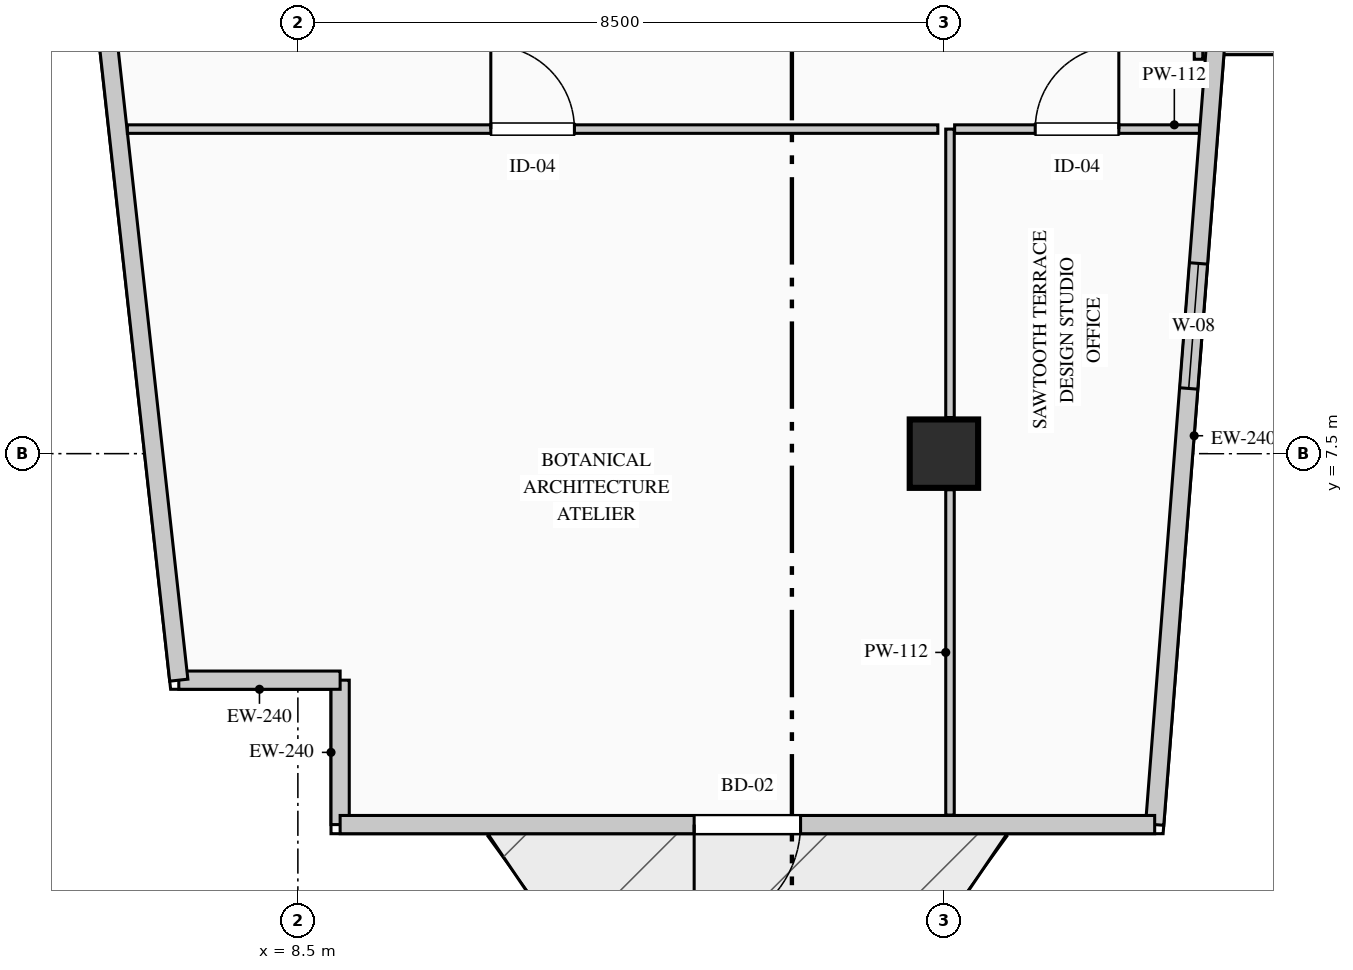
"""IFC4 building model, lengths in metres.
Left out: names, types, materials, properties, quantities, classifications, styles, units other than length and angle.
Written with IfcOpenShell. Run it as: python <this file> out.ifc"""

import sys

from ifc_helpers import new_model, si_unit, direction, frame, frame_2d, origin, origin_2d, place, context, subcontext, project, spatial, rectangle, extrude, element, fill, save


model = new_model("IFC4")
c1 = context("Model", 3, precision=1e-05, world=origin(), true_north=direction((0.0, 1.0)))
c2 = subcontext(c1, "Body", "Model", "MODEL_VIEW")
j1 = project(units=[si_unit("LENGTHUNIT", "METRE"), si_unit("PLANEANGLEUNIT", "RADIAN")], contexts=[c1])
p1 = place(None, origin())
s1 = spatial("IfcSite", under=j1, at=p1, CompositionType="ELEMENT")
p2 = place(p1, origin())
s2 = spatial("IfcBuilding", under=s1, at=p2, CompositionType="ELEMENT")
p3 = place(p2, frame((0.0, 0.0, 239.05)))
s3 = spatial("IfcBuildingStorey", under=s2, at=p3, CompositionType="ELEMENT", Elevation=239.05)
p4 = place(p3, frame((17.0, 7.5, 0.0), z_axis=(0.0, 0.0, 1.0), x_axis=(1.0, 0.0, 0.0)))
e1 = element("IfcColumn", 1, at=p4, inside=s3, PredefinedType="COLUMN", context=c2, shape_type="SweptSolid", body=[
    extrude(rectangle(XDim=0.9, YDim=0.9, at=origin_2d()), origin(), (0.0, 0.0, 1.0), 3.95),
])
p5 = place(p3, frame((9.056, 2.62, 0.0), z_axis=(0.0, 0.0, 1.0), x_axis=(0.0, 1.0, 0.0)))
e2 = element("IfcWall", 2, at=p5, inside=s3, PredefinedType="STANDARD", context=c2, shape_type="SweptSolid", body=[
    extrude(rectangle(XDim=1.9, YDim=0.24, at=frame_2d((0.95, 0.0))), origin(), (0.0, 0.0, 1.0), 3.7),
])
p6 = place(p3, frame((9.056, 4.52, 0.0), z_axis=(0.0, 0.0, 1.0), x_axis=(-1.0, 0.0, 0.0)))
e3 = element("IfcWall", 3, at=p6, inside=s3, PredefinedType="STANDARD", context=c2, shape_type="SweptSolid", body=[
    extrude(rectangle(XDim=2.123, YDim=0.24, at=frame_2d((1.061, 0.0))), origin(), (0.0, 0.0, 1.0), 3.7),
])
p7 = place(p3, frame((6.933, 4.52, 0.0), z_axis=(0.0, 0.0, 1.0), x_axis=(-0.109965284523, 0.993935428587, 0.0)))
e4 = element("IfcWall", 4, at=p7, inside=s3, PredefinedType="STANDARD", context=c2, shape_type="SweptSolid", body=[
    extrude(rectangle(XDim=37.186, YDim=0.24, at=frame_2d((18.593, 0.0))), origin(), (0.0, 0.0, 1.0), 3.7),
])
p8 = place(p7, frame((12.562, 0.0, 0.9)))
e5 = element("IfcOpeningElement", 5, at=p8, cuts=e4, PredefinedType="OPENING", context=c2, shape_type="SweptSolid", body=[
    extrude(rectangle(XDim=1.65, YDim=1.95, at=frame_2d((0.825, 0.975))), frame((0.0, 0.13, 0.0), z_axis=(0.0, -1.0, 0.0), x_axis=(1.0, 0.0, 0.0)), (0.0, 0.0, 1.0), 0.26),
])
p9 = place(p3, frame((26.495, 12.87, 0.0), z_axis=(0.0, 0.0, 1.0), x_axis=(-1.0, 0.0, 0.0)))
e6 = element("IfcWall", 6, at=p9, inside=s3, PredefinedType="STANDARD", context=c2, shape_type="SweptSolid", body=[
    extrude(rectangle(XDim=5.922, YDim=0.24, at=frame_2d((2.961, 0.0))), origin(), (0.0, 0.0, 1.0), 3.7),
])
p10 = place(p3, frame((20.573, 12.87, 0.0), z_axis=(0.0, 0.0, 1.0), x_axis=(-0.077816860153, -0.996967670627, 0.0)))
e7 = element("IfcWall", 7, at=p10, inside=s3, PredefinedType="STANDARD", context=c2, shape_type="SweptSolid", body=[
    extrude(rectangle(XDim=10.281, YDim=0.24, at=frame_2d((5.141, 0.0))), origin(), (0.0, 0.0, 1.0), 3.7),
])
p11 = place(p10, frame((2.876, 0.0, 0.9)))
e8 = element("IfcOpeningElement", 8, at=p11, cuts=e7, PredefinedType="OPENING", context=c2, shape_type="SweptSolid", body=[
    extrude(rectangle(XDim=1.65, YDim=1.95, at=frame_2d((0.825, 0.975))), frame((0.0, 0.13, 0.0), z_axis=(0.0, -1.0, 0.0), x_axis=(1.0, 0.0, 0.0)), (0.0, 0.0, 1.0), 0.26),
])
p12 = place(p3, frame((19.773, 2.62, 0.0), z_axis=(0.0, 0.0, 1.0), x_axis=(-1.0, 0.0, 0.0)))
e9 = element("IfcWall", 9, at=p12, inside=s3, PredefinedType="STANDARD", context=c2, shape_type="SweptSolid", body=[
    extrude(rectangle(XDim=10.717, YDim=0.24, at=frame_2d((5.358, 0.0))), origin(), (0.0, 0.0, 1.0), 3.7),
])
p13 = place(p12, frame((4.659, 0.0, 0.0)))
e10 = element("IfcOpeningElement", 10, at=p13, cuts=e9, PredefinedType="OPENING", context=c2, shape_type="SweptSolid", body=[
    extrude(rectangle(XDim=1.4, YDim=2.2, at=frame_2d((0.7, 1.1))), frame((0.0, 0.13, 0.0), z_axis=(0.0, -1.0, 0.0), x_axis=(1.0, 0.0, 0.0)), (0.0, 0.0, 1.0), 0.26),
])
p14 = place(p3, frame((17.08, 2.745, 0.0), z_axis=(0.0, 0.0, 1.0), x_axis=(0.0, 1.0, 0.0)))
e11 = element("IfcWall", 11, at=p14, inside=s3, PredefinedType="PARTITIONING", context=c2, shape_type="SweptSolid", body=[
    extrude(rectangle(XDim=4.28, YDim=0.112, at=frame_2d((2.14, 0.0))), origin(), (0.0, 0.0, 1.0), 3.7),
])
p15 = place(p3, frame((17.08, 7.975, 0.0), z_axis=(0.0, 0.0, 1.0), x_axis=(0.0, 1.0, 0.0)))
e12 = element("IfcWall", 12, at=p15, inside=s3, PredefinedType="PARTITIONING", context=c2, shape_type="SweptSolid", body=[
    extrude(rectangle(XDim=3.795, YDim=0.112, at=frame_2d((1.897, 0.0))), origin(), (0.0, 0.0, 1.0), 3.185),
])
p16 = place(p3, frame((17.141, 11.77, 0.0), z_axis=(0.0, 0.0, 1.0), x_axis=(1.0, 0.0, 0.0)))
e13 = element("IfcWall", 13, at=p16, inside=s3, PredefinedType="PARTITIONING", context=c2, shape_type="SweptSolid", body=[
    extrude(rectangle(XDim=3.221, YDim=0.112, at=frame_2d((1.61, 0.0))), origin(), (0.0, 0.0, 1.0), 3.7),
])
p17 = place(p16, frame((1.06, 0.0, 0.0)))
e14 = element("IfcOpeningElement", 14, at=p17, cuts=e13, PredefinedType="OPENING", context=c2, shape_type="SweptSolid", body=[
    extrude(rectangle(XDim=1.1, YDim=2.2, at=frame_2d((0.55, 1.1))), frame((0.0, 0.066, 0.0), z_axis=(0.0, -1.0, 0.0), x_axis=(1.0, 0.0, 0.0)), (0.0, 0.0, 1.0), 0.132),
])
p18 = place(p3, frame((6.257, 11.77, 0.0), z_axis=(0.0, 0.0, 1.0), x_axis=(1.0, 0.0, 0.0)))
e15 = element("IfcWall", 15, at=p18, inside=s3, PredefinedType="PARTITIONING", context=c2, shape_type="SweptSolid", body=[
    extrude(rectangle(XDim=10.663, YDim=0.112, at=frame_2d((5.332, 0.0))), origin(), (0.0, 0.0, 1.0), 3.7),
])
p19 = place(p18, frame((4.781, 0.0, 0.0)))
e16 = element("IfcOpeningElement", 16, at=p19, cuts=e15, PredefinedType="OPENING", context=c2, shape_type="SweptSolid", body=[
    extrude(rectangle(XDim=1.1, YDim=2.2, at=frame_2d((0.55, 1.1))), frame((0.0, 0.066, 0.0), z_axis=(0.0, -1.0, 0.0), x_axis=(1.0, 0.0, 0.0)), (0.0, 0.0, 1.0), 0.132),
])
p20 = place(p3, frame((20.35, 12.689, 0.0), z_axis=(0.0, 0.0, 1.0), x_axis=(0.0, 1.0, 0.0)))
e17 = element("IfcWall", 17, at=p20, inside=s3, PredefinedType="PARTITIONING", context=c2, shape_type="SweptSolid", body=[
    extrude(rectangle(XDim=6.121, YDim=0.112, at=frame_2d((3.061, 0.0))), origin(), (0.0, 0.0, 1.0), 3.7),
])
p21 = place(p20, frame((2.511, 0.0, 0.0)))
e18 = element("IfcOpeningElement", 18, at=p21, cuts=e17, PredefinedType="OPENING", context=c2, shape_type="SweptSolid", body=[
    extrude(rectangle(XDim=1.1, YDim=2.2, at=frame_2d((0.55, 1.1))), frame((0.0, 0.066, 0.0), z_axis=(0.0, -1.0, 0.0), x_axis=(1.0, 0.0, 0.0)), (0.0, 0.0, 1.0), 0.132),
])
p22 = place(p11, origin())
e19 = element("IfcWindow", 19, at=p22, inside=s3, PartitioningType="SINGLE_PANEL", PredefinedType="WINDOW", context=c2, shape_type="SweptSolid", body=[
    extrude(rectangle(XDim=1.65, YDim=1.95, at=frame_2d((0.825, 0.975))), frame((0.0, 0.03, 0.0), z_axis=(0.0, -1.0, 0.0), x_axis=(1.0, 0.0, 0.0)), (0.0, 0.0, 1.0), 0.06),
])
fill(e8, e19)
p23 = place(p13, origin())
e20 = element("IfcDoor", 20, at=p23, inside=s3, OperationType="SINGLE_SWING_RIGHT", PredefinedType="DOOR", context=c2, shape_type="SweptSolid", body=[
    extrude(rectangle(XDim=1.4, YDim=2.2, at=frame_2d((0.7, 1.1))), frame((0.0, 0.025, 0.0), z_axis=(0.0, -1.0, 0.0), x_axis=(1.0, 0.0, 0.0)), (0.0, 0.0, 1.0), 0.05),
])
fill(e10, e20)
p24 = place(p17, origin())
e21 = element("IfcDoor", 21, at=p24, inside=s3, OperationType="SINGLE_SWING_RIGHT", PredefinedType="DOOR", context=c2, shape_type="SweptSolid", body=[
    extrude(rectangle(XDim=1.1, YDim=2.2, at=frame_2d((0.55, 1.1))), frame((0.0, 0.025, 0.0), z_axis=(0.0, -1.0, 0.0), x_axis=(1.0, 0.0, 0.0)), (0.0, 0.0, 1.0), 0.05),
])
fill(e14, e21)
p25 = place(p19, origin())
e22 = element("IfcDoor", 22, at=p25, inside=s3, OperationType="SINGLE_SWING_LEFT", PredefinedType="DOOR", context=c2, shape_type="SweptSolid", body=[
    extrude(rectangle(XDim=1.1, YDim=2.2, at=frame_2d((0.55, 1.1))), frame((0.0, 0.025, 0.0), z_axis=(0.0, -1.0, 0.0), x_axis=(1.0, 0.0, 0.0)), (0.0, 0.0, 1.0), 0.05),
])
fill(e16, e22)
save(model, sys.argv[1])
